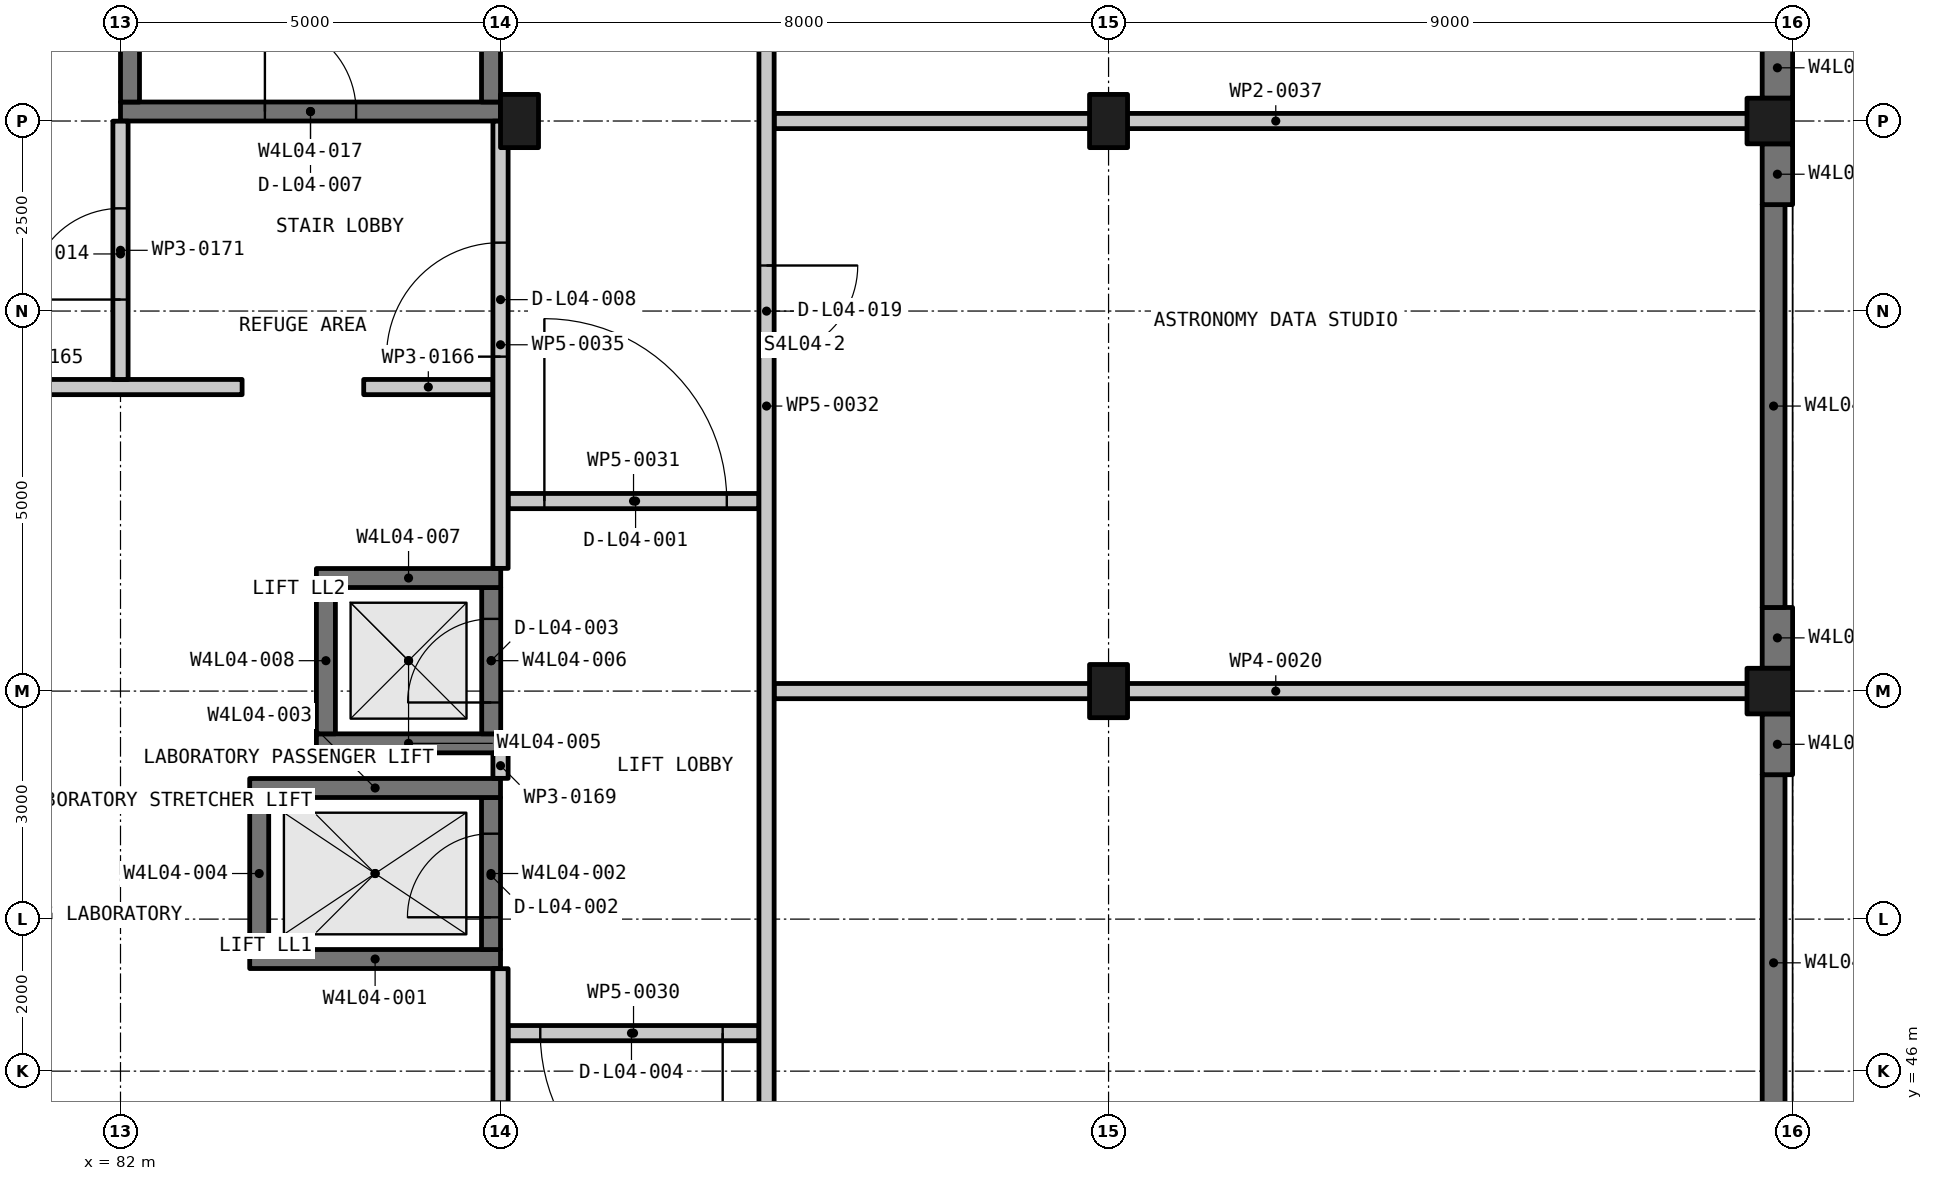
"""IFC4 building model, lengths in metres.
Left out: names, types, materials, properties, quantities, classifications, styles, units other than length and angle.
Written with IfcOpenShell. Run it as: python <this file> out.ifc"""

import sys

from ifc_helpers import new_model, si_unit, direction, frame, frame_2d, origin, origin_2d, place, context, subcontext, project, spatial, rectangle, extrude, element, fill, save


model = new_model("IFC4")
c1 = context("Model", 3, precision=1e-05, world=origin(), true_north=direction((0.0, 1.0)))
c2 = subcontext(c1, "Body", "Model", "MODEL_VIEW")
j1 = project(units=[si_unit("LENGTHUNIT", "METRE"), si_unit("PLANEANGLEUNIT", "RADIAN")], contexts=[c1])
p1 = place(None, origin())
s1 = spatial("IfcSite", under=j1, at=p1, CompositionType="ELEMENT")
p2 = place(p1, origin())
s2 = spatial("IfcBuilding", under=s1, at=p2, CompositionType="ELEMENT")
p3 = place(p2, frame((0.0, 0.0, 20.25)))
s3 = spatial("IfcBuildingStorey", under=s2, at=p3, CompositionType="ELEMENT", Elevation=20.25)
for number, where, z_axis, x_axis in (
    (1, (87.25, 58.5, -0.3), (0.0, 0.0, 1.0), (1.0, 0.0, 0.0)),
    (2, (95.0, 51.0, -0.3), (0.0, 0.0, 1.0), (1.0, 0.0, 0.0)),
    (3, (95.0, 58.5, -0.3), (0.0, 0.0, 1.0), (1.0, 0.0, 0.0)),
):
    element("IfcColumn", number, at=place(p3, frame(where, z_axis=z_axis, x_axis=x_axis)), inside=s3, PredefinedType="COLUMN", context=c2, shape_type="SweptSolid", body=[
        extrude(rectangle(XDim=0.5, YDim=0.7, at=origin_2d()), origin(), (0.0, 0.0, 1.0), 4.5),
    ])
for number, where, z_axis, x_axis in (
    (4, (103.7, 51.0, -0.3), (0.0, 0.0, 1.0), (1.0, 0.0, 0.0)),
    (5, (103.7, 58.5, -0.3), (0.0, 0.0, 1.0), (1.0, 0.0, 0.0)),
):
    element("IfcColumn", number, at=place(p3, frame(where, z_axis=z_axis, x_axis=x_axis)), inside=s3, PredefinedType="COLUMN", context=c2, shape_type="SweptSolid", body=[
        extrude(rectangle(XDim=0.6, YDim=0.6, at=origin_2d()), origin(), (0.0, 0.0, 1.0), 4.5),
    ])
p4 = place(p3, frame((83.7, 47.475, -0.3), z_axis=(0.0, 0.0, 1.0), x_axis=(1.0, 0.0, 0.0)))
e6 = element("IfcWall", 6, at=p4, inside=s3, PredefinedType="SHEAR", context=c2, shape_type="SweptSolid", body=[
    extrude(rectangle(XDim=3.3, YDim=0.25, at=frame_2d((1.65, 0.0))), origin(), (0.0, 0.0, 1.0), 4.5),
])
p5 = place(p3, frame((86.875, 47.6, -0.3), z_axis=(0.0, 0.0, 1.0), x_axis=(0.0, 1.0, 0.0)))
e7 = element("IfcWall", 7, at=p5, inside=s3, PredefinedType="SHEAR", context=c2, shape_type="SweptSolid", body=[
    extrude(rectangle(XDim=2.0, YDim=0.25, at=frame_2d((1.0, 0.0))), origin(), (0.0, 0.0, 1.0), 4.5),
])
p6 = place(p5, frame((0.424, 0.0, 0.3)))
e8 = element("IfcOpeningElement", 8, at=p6, cuts=e7, PredefinedType="OPENING", context=c2, shape_type="SweptSolid", body=[
    extrude(rectangle(XDim=1.1, YDim=2.1, at=frame_2d((0.55, 1.05))), frame((0.0, 0.135, 0.0), z_axis=(0.0, -1.0, 0.0), x_axis=(1.0, 0.0, 0.0)), (0.0, 0.0, 1.0), 0.27),
])
p7 = place(p3, frame((83.7, 49.725, -0.3), z_axis=(0.0, 0.0, 1.0), x_axis=(1.0, 0.0, 0.0)))
e9 = element("IfcWall", 9, at=p7, inside=s3, PredefinedType="SHEAR", context=c2, shape_type="SweptSolid", body=[
    extrude(rectangle(XDim=3.3, YDim=0.25, at=frame_2d((1.65, 0.0))), origin(), (0.0, 0.0, 1.0), 4.5),
])
p8 = place(p3, frame((83.825, 47.6, -0.3), z_axis=(0.0, 0.0, 1.0), x_axis=(0.0, 1.0, 0.0)))
e10 = element("IfcWall", 10, at=p8, inside=s3, PredefinedType="SHEAR", context=c2, shape_type="SweptSolid", body=[
    extrude(rectangle(XDim=2.0, YDim=0.25, at=frame_2d((1.0, 0.0))), origin(), (0.0, 0.0, 1.0), 4.5),
])
p9 = place(p3, frame((84.577, 50.312, -0.3), z_axis=(0.0, 0.0, 1.0), x_axis=(1.0, 0.0, 0.0)))
e11 = element("IfcWall", 11, at=p9, inside=s3, PredefinedType="SHEAR", context=c2, shape_type="SweptSolid", body=[
    extrude(rectangle(XDim=2.425, YDim=0.25, at=frame_2d((1.212, 0.0))), origin(), (0.0, 0.0, 1.0), 4.5),
])
p10 = place(p3, frame((86.877, 50.438, -0.3), z_axis=(0.0, 0.0, 1.0), x_axis=(0.0, 1.0, 0.0)))
e12 = element("IfcWall", 12, at=p10, inside=s3, PredefinedType="SHEAR", context=c2, shape_type="SweptSolid", body=[
    extrude(rectangle(XDim=1.925, YDim=0.25, at=frame_2d((0.962, 0.0))), origin(), (0.0, 0.0, 1.0), 4.5),
])
p11 = place(p10, frame((0.413, 0.0, 0.3)))
e13 = element("IfcOpeningElement", 13, at=p11, cuts=e12, PredefinedType="OPENING", context=c2, shape_type="SweptSolid", body=[
    extrude(rectangle(XDim=1.1, YDim=2.1, at=frame_2d((0.55, 1.05))), frame((0.0, 0.135, 0.0), z_axis=(0.0, -1.0, 0.0), x_axis=(1.0, 0.0, 0.0)), (0.0, 0.0, 1.0), 0.27),
])
p12 = place(p3, frame((84.577, 52.488, -0.3), z_axis=(0.0, 0.0, 1.0), x_axis=(1.0, 0.0, 0.0)))
e14 = element("IfcWall", 14, at=p12, inside=s3, PredefinedType="SHEAR", context=c2, shape_type="SweptSolid", body=[
    extrude(rectangle(XDim=2.425, YDim=0.25, at=frame_2d((1.212, 0.0))), origin(), (0.0, 0.0, 1.0), 4.5),
])
p13 = place(p3, frame((84.702, 50.438, -0.3), z_axis=(0.0, 0.0, 1.0), x_axis=(0.0, 1.0, 0.0)))
e15 = element("IfcWall", 15, at=p13, inside=s3, PredefinedType="SHEAR", context=c2, shape_type="SweptSolid", body=[
    extrude(rectangle(XDim=1.925, YDim=0.25, at=frame_2d((0.962, 0.0))), origin(), (0.0, 0.0, 1.0), 4.5),
])
p14 = place(p3, frame((82.0, 58.625, -0.3), z_axis=(0.0, 0.0, 1.0), x_axis=(1.0, 0.0, 0.0)))
e16 = element("IfcWall", 16, at=p14, inside=s3, PredefinedType="SHEAR", context=c2, shape_type="SweptSolid", body=[
    extrude(rectangle(XDim=5.0, YDim=0.25, at=frame_2d((2.5, 0.0))), origin(), (0.0, 0.0, 1.0), 4.5),
])
p15 = place(p14, frame((1.9, 0.0, 0.3)))
e17 = element("IfcOpeningElement", 17, at=p15, cuts=e16, PredefinedType="OPENING", context=c2, shape_type="SweptSolid", body=[
    extrude(rectangle(XDim=1.2, YDim=2.2, at=frame_2d((0.6, 1.1))), frame((0.0, 0.135, 0.0), z_axis=(0.0, -1.0, 0.0), x_axis=(1.0, 0.0, 0.0)), (0.0, 0.0, 1.0), 0.27),
])
for number, where, z_axis, x_axis in (
    (18, (86.875, 58.75, -0.3), (0.0, 0.0, 1.0), (0.0, 1.0, 0.0)),
    (19, (82.125, 58.75, -0.3), (0.0, 0.0, 1.0), (0.0, 1.0, 0.0)),
):
    element("IfcWall", number, at=place(p3, frame(where, z_axis=z_axis, x_axis=x_axis)), inside=s3, PredefinedType="SHEAR", context=c2, shape_type="SweptSolid", body=[
        extrude(rectangle(XDim=7.0, YDim=0.25, at=frame_2d((3.5, 0.0))), origin(), (0.0, 0.0, 1.0), 4.5),
    ])
p16 = place(p3, frame((103.75, 44.95, -0.3), z_axis=(0.0, 0.0, 1.0), x_axis=(0.0, 1.0, 0.0)))
e20 = element("IfcWall", 20, at=p16, inside=s3, PredefinedType="SOLIDWALL", context=c2, shape_type="SweptSolid", body=[
    extrude(rectangle(XDim=4.95, YDim=0.3, at=frame_2d((2.475, 0.0))), origin(), (0.0, 0.0, 1.0), 4.5),
])
for number, where, z_axis, x_axis in (
    (21, (103.8, 49.9, -0.3), (0.0, 0.0, 1.0), (0.0, 1.0, 0.0)),
    (22, (103.8, 51.3, -0.3), (0.0, 0.0, 1.0), (0.0, 1.0, 0.0)),
):
    element("IfcWall", number, at=place(p3, frame(where, z_axis=z_axis, x_axis=x_axis)), inside=s3, PredefinedType="SOLIDWALL", context=c2, shape_type="SweptSolid", body=[
        extrude(rectangle(XDim=0.8, YDim=0.4, at=frame_2d((0.4, 0.0))), origin(), (0.0, 0.0, 1.0), 4.5),
    ])
p17 = place(p3, frame((103.75, 52.1, -0.3), z_axis=(0.0, 0.0, 1.0), x_axis=(0.0, 1.0, 0.0)))
e23 = element("IfcWall", 23, at=p17, inside=s3, PredefinedType="SOLIDWALL", context=c2, shape_type="SweptSolid", body=[
    extrude(rectangle(XDim=5.3, YDim=0.3, at=frame_2d((2.65, 0.0))), origin(), (0.0, 0.0, 1.0), 4.5),
])
for number, where, z_axis, x_axis in (
    (24, (103.8, 57.4, -0.3), (0.0, 0.0, 1.0), (0.0, 1.0, 0.0)),
    (25, (103.8, 58.8, -0.3), (0.0, 0.0, 1.0), (0.0, 1.0, 0.0)),
):
    element("IfcWall", number, at=place(p3, frame(where, z_axis=z_axis, x_axis=x_axis)), inside=s3, PredefinedType="SOLIDWALL", context=c2, shape_type="SweptSolid", body=[
        extrude(rectangle(XDim=0.8, YDim=0.4, at=frame_2d((0.4, 0.0))), origin(), (0.0, 0.0, 1.0), 4.5),
    ])
p18 = place(p3, frame((90.4, 46.5, 0.0), z_axis=(0.0, 0.0, 1.0), x_axis=(-1.0, 0.0, 0.0)))
e26 = element("IfcWall", 26, at=p18, inside=s3, PredefinedType="PARTITIONING", context=c2, shape_type="SweptSolid", body=[
    extrude(rectangle(XDim=3.3, YDim=0.2, at=frame_2d((1.65, 0.0))), origin(), (0.0, 0.0, 1.0), 3.4),
])
p19 = place(p18, frame((0.477, 0.0, 0.0)))
e27 = element("IfcOpeningElement", 27, at=p19, cuts=e26, PredefinedType="OPENING", context=c2, shape_type="SweptSolid", body=[
    extrude(rectangle(XDim=2.4, YDim=2.1, at=frame_2d((1.2, 1.05))), frame((0.0, 0.11, 0.0), z_axis=(0.0, -1.0, 0.0), x_axis=(1.0, 0.0, 0.0)), (0.0, 0.0, 1.0), 0.22),
])
p20 = place(p3, frame((90.6, 51.0, 0.0), z_axis=(0.0, 0.0, 1.0), x_axis=(1.0, 0.0, 0.0)))
e28 = element("IfcWall", 28, at=p20, inside=s3, PredefinedType="PARTITIONING", context=c2, shape_type="SweptSolid", body=[
    extrude(rectangle(XDim=13.2, YDim=0.2, at=frame_2d((6.6, 0.0))), origin(), (0.0, 0.0, 1.0), 3.3),
])
p21 = place(p3, frame((87.1, 53.5, 0.0), z_axis=(0.0, 0.0, 1.0), x_axis=(1.0, 0.0, 0.0)))
e29 = element("IfcWall", 29, at=p21, inside=s3, PredefinedType="PARTITIONING", context=c2, shape_type="SweptSolid", body=[
    extrude(rectangle(XDim=3.3, YDim=0.2, at=frame_2d((1.65, 0.0))), origin(), (0.0, 0.0, 1.0), 3.4),
])
p22 = place(p21, frame((0.477, 0.0, 0.0)))
e30 = element("IfcOpeningElement", 30, at=p22, cuts=e29, PredefinedType="OPENING", context=c2, shape_type="SweptSolid", body=[
    extrude(rectangle(XDim=2.4, YDim=2.1, at=frame_2d((1.2, 1.05))), frame((0.0, 0.11, 0.0), z_axis=(0.0, -1.0, 0.0), x_axis=(1.0, 0.0, 0.0)), (0.0, 0.0, 1.0), 0.22),
])
p23 = place(p3, frame((78.2, 55.0, 0.0), z_axis=(0.0, 0.0, 1.0), x_axis=(1.0, 0.0, 0.0)))
e31 = element("IfcWall", 31, at=p23, inside=s3, PredefinedType="PARTITIONING", context=c2, shape_type="SweptSolid", body=[
    extrude(rectangle(XDim=5.4, YDim=0.2, at=frame_2d((2.7, 0.0))), origin(), (0.0, 0.0, 1.0), 3.4),
])
p24 = place(p3, frame((85.2, 55.0, 0.0), z_axis=(0.0, 0.0, 1.0), x_axis=(1.0, 0.0, 0.0)))
e32 = element("IfcWall", 32, at=p24, inside=s3, PredefinedType="PARTITIONING", context=c2, shape_type="SweptSolid", body=[
    extrude(rectangle(XDim=1.7, YDim=0.2, at=frame_2d((0.85, 0.0))), origin(), (0.0, 0.0, 1.0), 3.6),
])
p25 = place(p3, frame((90.6, 58.5, 0.0), z_axis=(0.0, 0.0, 1.0), x_axis=(1.0, 0.0, 0.0)))
e33 = element("IfcWall", 33, at=p25, inside=s3, PredefinedType="PARTITIONING", context=c2, shape_type="SweptSolid", body=[
    extrude(rectangle(XDim=13.2, YDim=0.2, at=frame_2d((6.6, 0.0))), origin(), (0.0, 0.0, 1.0), 3.3),
])
p26 = place(p3, frame((90.5, 80.8, 0.0), z_axis=(0.0, 0.0, 1.0), x_axis=(0.0, -1.0, 0.0)))
e34 = element("IfcWall", 34, at=p26, inside=s3, PredefinedType="PARTITIONING", context=c2, shape_type="SweptSolid", body=[
    extrude(rectangle(XDim=52.1, YDim=0.2, at=frame_2d((26.05, 0.0))), origin(), (0.0, 0.0, 1.0), 3.3),
])
p27 = place(p26, frame((47.85, 0.0, 0.0)))
e35 = element("IfcOpeningElement", 35, at=p27, cuts=e34, PredefinedType="OPENING", context=c2, shape_type="SweptSolid", body=[
    extrude(rectangle(XDim=1.2, YDim=2.1, at=frame_2d((0.6, 1.05))), frame((0.0, 0.11, 0.0), z_axis=(0.0, -1.0, 0.0), x_axis=(1.0, 0.0, 0.0)), (0.0, 0.0, 1.0), 0.22),
])
p28 = place(p26, frame((38.949, 0.0, 0.0)))
e36 = element("IfcOpeningElement", 36, at=p28, cuts=e34, PredefinedType="OPENING", context=c2, shape_type="SweptSolid", body=[
    extrude(rectangle(XDim=1.2, YDim=2.1, at=frame_2d((0.6, 1.05))), frame((0.0, 0.11, 0.0), z_axis=(0.0, -1.0, 0.0), x_axis=(1.0, 0.0, 0.0)), (0.0, 0.0, 1.0), 0.22),
])
p29 = place(p26, frame((24.201, 0.0, 0.0)))
e37 = element("IfcOpeningElement", 37, at=p29, cuts=e34, PredefinedType="OPENING", context=c2, shape_type="SweptSolid", body=[
    extrude(rectangle(XDim=1.2, YDim=2.1, at=frame_2d((0.6, 1.05))), frame((0.0, 0.11, 0.0), z_axis=(0.0, -1.0, 0.0), x_axis=(1.0, 0.0, 0.0)), (0.0, 0.0, 1.0), 0.22),
])
p30 = place(p26, frame((14.2, 0.0, 0.0)))
e38 = element("IfcOpeningElement", 38, at=p30, cuts=e34, PredefinedType="OPENING", context=c2, shape_type="SweptSolid", body=[
    extrude(rectangle(XDim=1.2, YDim=2.1, at=frame_2d((0.6, 1.05))), frame((0.0, 0.11, 0.0), z_axis=(0.0, -1.0, 0.0), x_axis=(1.0, 0.0, 0.0)), (0.0, 0.0, 1.0), 0.22),
])
p31 = place(p26, frame((3.075, 0.0, 0.0)))
e39 = element("IfcOpeningElement", 39, at=p31, cuts=e34, PredefinedType="OPENING", context=c2, shape_type="SweptSolid", body=[
    extrude(rectangle(XDim=1.2, YDim=2.1, at=frame_2d((0.6, 1.05))), frame((0.0, 0.11, 0.0), z_axis=(0.0, -1.0, 0.0), x_axis=(1.0, 0.0, 0.0)), (0.0, 0.0, 1.0), 0.22),
])
p32 = place(p3, frame((87.0, 43.502, 0.0), z_axis=(0.0, 0.0, 1.0), x_axis=(0.0, 1.0, 0.0)))
e40 = element("IfcWall", 40, at=p32, inside=s3, PredefinedType="PARTITIONING", context=c2, shape_type="SweptSolid", body=[
    extrude(rectangle(XDim=3.846, YDim=0.2, at=frame_2d((1.923, 0.0))), origin(), (0.0, 0.0, 1.0), 3.4),
])
p33 = place(p32, frame((0.899, 0.0, 0.0)))
e41 = element("IfcOpeningElement", 41, at=p33, cuts=e40, PredefinedType="OPENING", context=c2, shape_type="SweptSolid", body=[
    extrude(rectangle(XDim=1.2, YDim=2.1, at=frame_2d((0.6, 1.05))), frame((0.0, 0.11, 0.0), z_axis=(0.0, -1.0, 0.0), x_axis=(1.0, 0.0, 0.0)), (0.0, 0.0, 1.0), 0.22),
])
p34 = place(p3, frame((87.0, 49.852, 0.0), z_axis=(0.0, 0.0, 1.0), x_axis=(0.0, 1.0, 0.0)))
e42 = element("IfcWall", 42, at=p34, inside=s3, PredefinedType="PARTITIONING", context=c2, shape_type="SweptSolid", body=[
    extrude(rectangle(XDim=0.333, YDim=0.2, at=frame_2d((0.167, 0.0))), origin(), (0.0, 0.0, 1.0), 3.4),
])
p35 = place(p3, frame((87.0, 52.615, 0.0), z_axis=(0.0, 0.0, 1.0), x_axis=(0.0, 1.0, 0.0)))
e43 = element("IfcWall", 43, at=p35, inside=s3, PredefinedType="PARTITIONING", context=c2, shape_type="SweptSolid", body=[
    extrude(rectangle(XDim=5.884, YDim=0.2, at=frame_2d((2.942, 0.0))), origin(), (0.0, 0.0, 1.0), 3.4),
])
p36 = place(p35, frame((2.785, 0.0, 0.0)))
e44 = element("IfcOpeningElement", 44, at=p36, cuts=e43, PredefinedType="OPENING", context=c2, shape_type="SweptSolid", body=[
    extrude(rectangle(XDim=1.5, YDim=2.1, at=frame_2d((0.75, 1.05))), frame((0.0, 0.11, 0.0), z_axis=(0.0, -1.0, 0.0), x_axis=(1.0, 0.0, 0.0)), (0.0, 0.0, 1.0), 0.22),
])
p37 = place(p3, frame((82.0, 55.1, 0.0), z_axis=(0.0, 0.0, 1.0), x_axis=(0.0, 1.0, 0.0)))
e45 = element("IfcWall", 45, at=p37, inside=s3, PredefinedType="PARTITIONING", context=c2, shape_type="SweptSolid", body=[
    extrude(rectangle(XDim=3.398, YDim=0.2, at=frame_2d((1.699, 0.0))), origin(), (0.0, 0.0, 1.0), 3.4),
])
p38 = place(p37, frame((1.051, 0.0, 0.0)))
e46 = element("IfcOpeningElement", 46, at=p38, cuts=e45, PredefinedType="OPENING", context=c2, shape_type="SweptSolid", body=[
    extrude(rectangle(XDim=1.2, YDim=2.1, at=frame_2d((0.6, 1.05))), frame((0.0, 0.11, 0.0), z_axis=(0.0, -1.0, 0.0), x_axis=(1.0, 0.0, 0.0)), (0.0, 0.0, 1.0), 0.22),
])
p39 = place(p22, origin())
e47 = element("IfcDoor", 47, at=p39, inside=s3, OperationType="DOUBLE_DOOR_SINGLE_SWING", PredefinedType="DOOR", context=c2, shape_type="SweptSolid", body=[
    extrude(rectangle(XDim=2.4, YDim=2.1, at=frame_2d((1.2, 1.05))), frame((0.0, 0.025, 0.0), z_axis=(0.0, -1.0, 0.0), x_axis=(1.0, 0.0, 0.0)), (0.0, 0.0, 1.0), 0.05),
])
fill(e30, e47)
p40 = place(p6, origin())
e48 = element("IfcDoor", 48, at=p40, inside=s3, OperationType="DOUBLE_DOOR_SLIDING", PredefinedType="DOOR", context=c2, shape_type="SweptSolid", body=[
    extrude(rectangle(XDim=1.1, YDim=2.1, at=frame_2d((0.55, 1.05))), frame((0.0, 0.025, 0.0), z_axis=(0.0, -1.0, 0.0), x_axis=(1.0, 0.0, 0.0)), (0.0, 0.0, 1.0), 0.05),
])
fill(e8, e48)
p41 = place(p11, origin())
e49 = element("IfcDoor", 49, at=p41, inside=s3, OperationType="DOUBLE_DOOR_SLIDING", PredefinedType="DOOR", context=c2, shape_type="SweptSolid", body=[
    extrude(rectangle(XDim=1.1, YDim=2.1, at=frame_2d((0.55, 1.05))), frame((0.0, 0.025, 0.0), z_axis=(0.0, -1.0, 0.0), x_axis=(1.0, 0.0, 0.0)), (0.0, 0.0, 1.0), 0.05),
])
fill(e13, e49)
p42 = place(p19, origin())
e50 = element("IfcDoor", 50, at=p42, inside=s3, OperationType="DOUBLE_DOOR_SINGLE_SWING", PredefinedType="DOOR", context=c2, shape_type="SweptSolid", body=[
    extrude(rectangle(XDim=2.4, YDim=2.1, at=frame_2d((1.2, 1.05))), frame((0.0, 0.025, 0.0), z_axis=(0.0, -1.0, 0.0), x_axis=(1.0, 0.0, 0.0)), (0.0, 0.0, 1.0), 0.05),
])
fill(e27, e50)
p43 = place(p15, origin())
e51 = element("IfcDoor", 51, at=p43, inside=s3, OperationType="SINGLE_SWING_LEFT", PredefinedType="DOOR", context=c2, shape_type="SweptSolid", body=[
    extrude(rectangle(XDim=1.2, YDim=2.2, at=frame_2d((0.6, 1.1))), frame((0.0, 0.025, 0.0), z_axis=(0.0, -1.0, 0.0), x_axis=(1.0, 0.0, 0.0)), (0.0, 0.0, 1.0), 0.05),
])
fill(e17, e51)
p44 = place(p36, origin())
e52 = element("IfcDoor", 52, at=p44, inside=s3, OperationType="DOUBLE_DOOR_SINGLE_SWING", PredefinedType="DOOR", context=c2, shape_type="SweptSolid", body=[
    extrude(rectangle(XDim=1.5, YDim=2.1, at=frame_2d((0.75, 1.05))), frame((0.0, 0.025, 0.0), z_axis=(0.0, -1.0, 0.0), x_axis=(1.0, 0.0, 0.0)), (0.0, 0.0, 1.0), 0.05),
])
fill(e44, e52)
p45 = place(p33, origin())
e53 = element("IfcDoor", 53, at=p45, inside=s3, OperationType="SINGLE_SWING_RIGHT", PredefinedType="DOOR", context=c2, shape_type="SweptSolid", body=[
    extrude(rectangle(XDim=1.2, YDim=2.1, at=frame_2d((0.6, 1.05))), frame((0.0, 0.025, 0.0), z_axis=(0.0, -1.0, 0.0), x_axis=(1.0, 0.0, 0.0)), (0.0, 0.0, 1.0), 0.05),
])
fill(e41, e53)
p46 = place(p38, origin())
e54 = element("IfcDoor", 54, at=p46, inside=s3, OperationType="SINGLE_SWING_RIGHT", PredefinedType="DOOR", context=c2, shape_type="SweptSolid", body=[
    extrude(rectangle(XDim=1.2, YDim=2.1, at=frame_2d((0.6, 1.05))), frame((0.0, 0.025, 0.0), z_axis=(0.0, -1.0, 0.0), x_axis=(1.0, 0.0, 0.0)), (0.0, 0.0, 1.0), 0.05),
])
fill(e46, e54)
p47 = place(p29, origin())
e55 = element("IfcDoor", 55, at=p47, inside=s3, OperationType="SINGLE_SWING_RIGHT", PredefinedType="DOOR", context=c2, shape_type="SweptSolid", body=[
    extrude(rectangle(XDim=1.2, YDim=2.1, at=frame_2d((0.6, 1.05))), frame((0.0, 0.025, 0.0), z_axis=(0.0, -1.0, 0.0), x_axis=(1.0, 0.0, 0.0)), (0.0, 0.0, 1.0), 0.05),
])
fill(e37, e55)
save(model, sys.argv[1])
